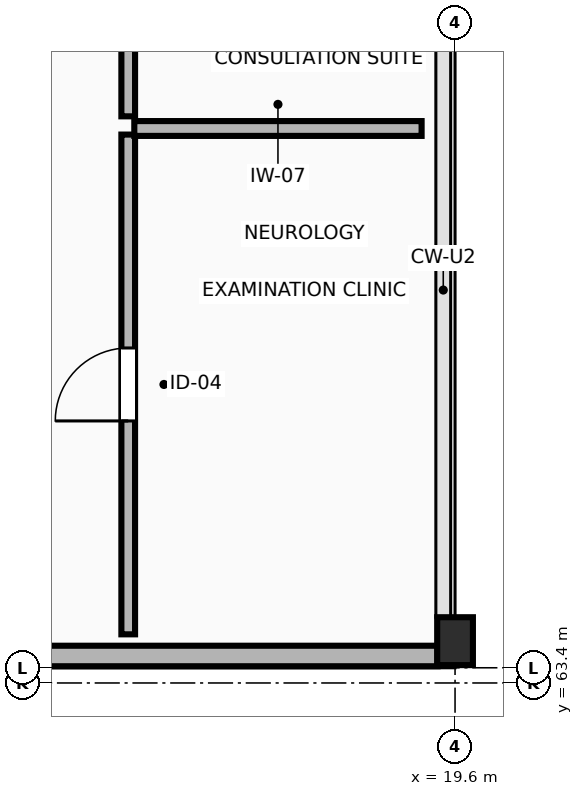
"""IFC4 building model, lengths in metres.
Left out: names, types, materials, properties, quantities, classifications, styles, units other than length and angle.
Written with IfcOpenShell. Run it as: python <this file> out.ifc"""

import sys

from ifc_helpers import new_model, si_unit, direction, frame, frame_2d, origin, origin_2d, place, context, subcontext, project, spatial, rectangle, extrude, element, fill, save


model = new_model("IFC4")
c1 = context("Model", 3, precision=1e-05, world=origin(), true_north=direction((0.0, 1.0)))
c2 = subcontext(c1, "Body", "Model", "MODEL_VIEW")
j1 = project(units=[si_unit("LENGTHUNIT", "METRE"), si_unit("PLANEANGLEUNIT", "RADIAN")], contexts=[c1])
p1 = place(None, origin())
s1 = spatial("IfcSite", under=j1, at=p1, CompositionType="ELEMENT")
p2 = place(p1, origin())
s2 = spatial("IfcBuilding", under=s1, at=p2, CompositionType="ELEMENT")
p3 = place(p2, origin())
s3 = spatial("IfcBuildingStorey", under=s2, at=p3, CompositionType="ELEMENT", Elevation=0.0)
p4 = place(p3, frame((19.6, 63.95, -1.75), z_axis=(0.0, 0.0, 1.0), x_axis=(1.0, 0.0, 0.0)))
e1 = element("IfcColumn", 1, at=p4, inside=s3, PredefinedType="COLUMN", context=c2, shape_type="SweptSolid", body=[
    extrude(rectangle(XDim=0.47, YDim=0.63, at=origin_2d()), origin(), (0.0, 0.0, 1.0), 7.15),
])
p5 = place(p3, frame((11.485, 63.755, 0.0), z_axis=(0.0, 0.0, 1.0), x_axis=(1.0, 0.0, 0.0)))
e2 = element("IfcWall", 2, at=p5, inside=s3, PredefinedType="STANDARD", context=c2, shape_type="SweptSolid", body=[
    extrude(rectangle(XDim=7.885, YDim=0.27, at=frame_2d((3.942, 0.0))), origin(), (0.0, 0.0, 1.0), 5.05),
])
p6 = place(p3, frame((15.3, 64.04, 0.0), z_axis=(0.0, 0.0, 1.0), x_axis=(0.0, 1.0, 0.0)))
e3 = element("IfcWall", 3, at=p6, inside=s3, PredefinedType="PARTITIONING", context=c2, shape_type="SweptSolid", body=[
    extrude(rectangle(XDim=6.576, YDim=0.18, at=frame_2d((3.288, 0.0))), origin(), (0.0, 0.0, 1.0), 5.05),
])
p7 = place(p6, frame((2.808, 0.0, 0.0)))
e4 = element("IfcOpeningElement", 4, at=p7, cuts=e3, PredefinedType="OPENING", context=c2, shape_type="SweptSolid", body=[
    extrude(rectangle(XDim=0.96, YDim=2.1, at=frame_2d((0.48, 1.05))), frame((0.0, 0.1, 0.0), z_axis=(0.0, -1.0, 0.0), x_axis=(1.0, 0.0, 0.0)), (0.0, 0.0, 1.0), 0.2),
])
p8 = place(p3, frame((15.38, 70.696, 0.0), z_axis=(0.0, 0.0, 1.0), x_axis=(1.0, 0.0, 0.0)))
e5 = element("IfcWall", 5, at=p8, inside=s3, PredefinedType="PARTITIONING", context=c2, shape_type="SweptSolid", body=[
    extrude(rectangle(XDim=3.78, YDim=0.195, at=frame_2d((1.89, 0.0))), origin(), (0.0, 0.0, 1.0), 5.05),
])
p9 = place(p3, frame((15.3, 70.856, 0.0), z_axis=(0.0, 0.0, 1.0), x_axis=(0.0, 1.0, 0.0)))
e6 = element("IfcWall", 6, at=p9, inside=s3, PredefinedType="PARTITIONING", context=c2, shape_type="SweptSolid", body=[
    extrude(rectangle(XDim=6.536, YDim=0.18, at=frame_2d((3.268, 0.0))), origin(), (0.0, 0.0, 1.0), 5.05),
])
p10 = place(p9, frame((2.628, 0.0, 0.0)))
e7 = element("IfcOpeningElement", 7, at=p10, cuts=e6, PredefinedType="OPENING", context=c2, shape_type="SweptSolid", body=[
    extrude(rectangle(XDim=1.28, YDim=2.25, at=frame_2d((0.64, 1.125))), frame((0.0, 0.1, 0.0), z_axis=(0.0, -1.0, 0.0), x_axis=(1.0, 0.0, 0.0)), (0.0, 0.0, 1.0), 0.2),
])
p11 = place(p7, origin())
e8 = element("IfcDoor", 8, at=p11, inside=s3, OperationType="SINGLE_SWING_LEFT", PredefinedType="DOOR", context=c2, shape_type="SweptSolid", body=[
    extrude(rectangle(XDim=0.96, YDim=2.1, at=frame_2d((0.48, 1.05))), frame((0.0, 0.025, 0.0), z_axis=(0.0, -1.0, 0.0), x_axis=(1.0, 0.0, 0.0)), (0.0, 0.0, 1.0), 0.05),
])
fill(e4, e8)
save(model, sys.argv[1])
